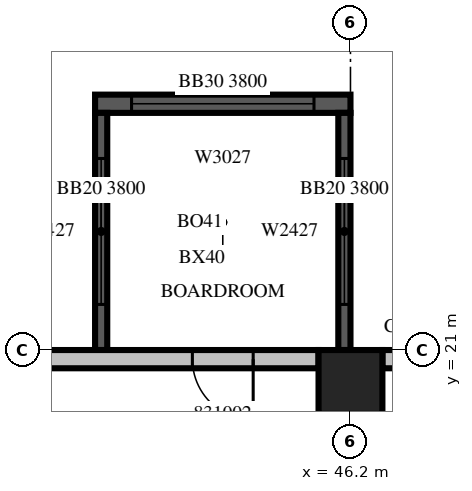
"""IFC4 building model, lengths in metres.
Left out: names, types, materials, properties, quantities, classifications, styles, units other than length and angle.
Written with IfcOpenShell. Run it as: python <this file> out.ifc"""

import sys

from ifc_helpers import new_model, si_unit, direction, frame, frame_2d, origin, origin_2d, place, context, subcontext, project, spatial, rectangle, extrude, source, transform, mapped, element, fill, save


model = new_model("IFC4")
c1 = context("Model", 3, precision=1e-05, world=origin(), true_north=direction((0.0, 1.0)))
c2 = subcontext(c1, "Body", "Model", "MODEL_VIEW")
j1 = project(units=[si_unit("LENGTHUNIT", "METRE"), si_unit("PLANEANGLEUNIT", "RADIAN")], contexts=[c1])
p1 = place(None, origin())
s1 = spatial("IfcSite", under=j1, at=p1, CompositionType="ELEMENT")
p2 = place(p1, origin())
s2 = spatial("IfcBuilding", under=s1, at=p2, CompositionType="ELEMENT")
p3 = place(p2, frame((0.0, 0.0, 141.3)))
s3 = spatial("IfcBuildingStorey", under=s2, at=p3, CompositionType="ELEMENT", Elevation=141.3)
m1 = source(origin(), c2, "Body", "SweptSolid", [
    extrude(rectangle(XDim=1.05, YDim=1.05, at=origin_2d()), origin(), (0.0, 0.0, 1.0), 4.2),
])
p4 = place(p3, frame((46.2, 20.475, 0.0), z_axis=(0.0, 0.0, 1.0), x_axis=(1.0, 0.0, 0.0)))
e1 = element("IfcColumn", 1, at=p4, inside=s3, PredefinedType="COLUMN", context=c2, shape_type="MappedRepresentation", body=[
    mapped(m1, transform((0.0, 0.0, 0.0), scale=1.0)),
])
m2 = source(origin(), c2, "Body", "SweptSolid", [
    extrude(rectangle(XDim=4.2, YDim=0.3, at=frame_2d((2.1, 0.0))), origin(), (0.0, 0.0, 1.0), 3.8),
])
p5 = place(p3, frame((46.2, 25.05, 0.0), z_axis=(0.0, 0.0, 1.0), x_axis=(-1.0, 0.0, 0.0)))
e2 = element("IfcWall", 2, at=p5, inside=s3, PredefinedType="SOLIDWALL", context=c2, shape_type="MappedRepresentation", body=[
    mapped(m2, transform((0.0, 0.0, 0.0), scale=1.0)),
])
m3 = source(origin(), c2, "Body", "SweptSolid", [
    extrude(rectangle(XDim=3.0, YDim=2.7, at=frame_2d((1.5, 1.35))), frame((0.0, 0.16, 0.0), z_axis=(0.0, -1.0, 0.0), x_axis=(1.0, 0.0, 0.0)), (0.0, 0.0, 1.0), 0.32),
])
p6 = place(p5, frame((0.6, 0.0, 0.6)))
e3 = element("IfcOpeningElement", 3, at=p6, cuts=e2, PredefinedType="OPENING", context=c2, shape_type="MappedRepresentation", body=[
    mapped(m3, transform((0.0, 0.0, 0.0), scale=1.0)),
])
m4 = source(origin(), c2, "Body", "SweptSolid", [
    extrude(rectangle(XDim=3.9, YDim=0.2, at=frame_2d((1.95, 0.0))), origin(), (0.0, 0.0, 1.0), 3.8),
])
p7 = place(p3, frame((46.1, 21.0, 0.0), z_axis=(0.0, 0.0, 1.0), x_axis=(0.0, 1.0, 0.0)))
e4 = element("IfcWall", 4, at=p7, inside=s3, PredefinedType="SOLIDWALL", context=c2, shape_type="MappedRepresentation", body=[
    mapped(m4, transform((0.0, 0.0, 0.0), scale=1.0)),
])
m5 = source(origin(), c2, "Body", "SweptSolid", [
    extrude(rectangle(XDim=2.4, YDim=2.7, at=frame_2d((1.2, 1.35))), frame((0.0, 0.11, 0.0), z_axis=(0.0, -1.0, 0.0), x_axis=(1.0, 0.0, 0.0)), (0.0, 0.0, 1.0), 0.22),
])
p8 = place(p7, frame((0.75, 0.0, 0.6)))
e5 = element("IfcOpeningElement", 5, at=p8, cuts=e4, PredefinedType="OPENING", context=c2, shape_type="MappedRepresentation", body=[
    mapped(m5, transform((0.0, 0.0, 0.0), scale=1.0)),
])
p9 = place(p3, frame((42.1, 21.0, 0.0), z_axis=(0.0, 0.0, 1.0), x_axis=(0.0, 1.0, 0.0)))
e6 = element("IfcWall", 6, at=p9, inside=s3, PredefinedType="SOLIDWALL", context=c2, shape_type="MappedRepresentation", body=[
    mapped(m4, transform((0.0, 0.0, 0.0), scale=1.0)),
])
p10 = place(p9, frame((0.75, 0.0, 0.6)))
e7 = element("IfcOpeningElement", 7, at=p10, cuts=e6, PredefinedType="OPENING", context=c2, shape_type="MappedRepresentation", body=[
    mapped(m5, transform((0.0, 0.0, 0.0), scale=1.0)),
])
m6 = source(origin(), c2, "Body", "SweptSolid", [
    extrude(rectangle(XDim=4.83, YDim=0.3, at=frame_2d((2.415, 0.0))), origin(), (0.0, 0.0, 1.0), 3.8),
])
p11 = place(p3, frame((51.555, 20.85, 0.0), z_axis=(0.0, 0.0, 1.0), x_axis=(-1.0, 0.0, 0.0)))
e8 = element("IfcWall", 8, at=p11, inside=s3, PredefinedType="STANDARD", context=c2, shape_type="MappedRepresentation", body=[
    mapped(m6, transform((0.0, 0.0, 0.0), scale=1.0)),
])
m7 = source(origin(), c2, "Body", "SweptSolid", [
    extrude(rectangle(XDim=2.4, YDim=2.7, at=frame_2d((1.2, 1.35))), frame((0.0, 0.16, 0.0), z_axis=(0.0, -1.0, 0.0), x_axis=(1.0, 0.0, 0.0)), (0.0, 0.0, 1.0), 0.32),
])
p12 = place(p11, frame((2.055, 0.0, 0.6)))
e9 = element("IfcOpeningElement", 9, at=p12, cuts=e8, PredefinedType="OPENING", context=c2, shape_type="MappedRepresentation", body=[
    mapped(m7, transform((0.0, 0.0, 0.0), scale=1.0)),
])
m8 = source(origin(), c2, "Body", "SweptSolid", [
    extrude(rectangle(XDim=7.35, YDim=0.3, at=frame_2d((3.675, 0.0))), origin(), (0.0, 0.0, 1.0), 3.8),
])
p13 = place(p3, frame((45.675, 20.85, 0.0), z_axis=(0.0, 0.0, 1.0), x_axis=(-1.0, 0.0, 0.0)))
e10 = element("IfcWall", 10, at=p13, inside=s3, PredefinedType="STANDARD", context=c2, shape_type="MappedRepresentation", body=[
    mapped(m8, transform((0.0, 0.0, 0.0), scale=1.0)),
])
m9 = source(origin(), c2, "Body", "SweptSolid", [
    extrude(rectangle(XDim=1.0, YDim=2.1, at=frame_2d((0.5, 1.05))), frame((0.0, 0.16, 0.0), z_axis=(0.0, -1.0, 0.0), x_axis=(1.0, 0.0, 0.0)), (0.0, 0.0, 1.0), 0.32),
])
p14 = place(p13, frame((1.075, 0.0, 0.0)))
e11 = element("IfcOpeningElement", 11, at=p14, cuts=e10, PredefinedType="OPENING", context=c2, shape_type="MappedRepresentation", body=[
    mapped(m9, transform((0.0, 0.0, 0.0), scale=1.0)),
])
m10 = source(origin(), c2, "Body", "SweptSolid", [
    extrude(rectangle(XDim=3.0, YDim=2.7, at=frame_2d((1.5, 1.35))), frame((0.0, 0.03, 0.0), z_axis=(0.0, -1.0, 0.0), x_axis=(1.0, 0.0, 0.0)), (0.0, 0.0, 1.0), 0.06),
])
p15 = place(p6, origin())
e12 = element("IfcWindow", 12, at=p15, inside=s3, PartitioningType="SINGLE_PANEL", PredefinedType="WINDOW", context=c2, shape_type="MappedRepresentation", body=[
    mapped(m10, transform((0.0, 0.0, 0.0), scale=1.0)),
])
fill(e3, e12)
m11 = source(origin(), c2, "Body", "SweptSolid", [
    extrude(rectangle(XDim=2.4, YDim=2.7, at=frame_2d((1.2, 1.35))), frame((0.0, 0.03, 0.0), z_axis=(0.0, -1.0, 0.0), x_axis=(1.0, 0.0, 0.0)), (0.0, 0.0, 1.0), 0.06),
])
p16 = place(p8, origin())
e13 = element("IfcWindow", 13, at=p16, inside=s3, PartitioningType="SINGLE_PANEL", PredefinedType="WINDOW", context=c2, shape_type="MappedRepresentation", body=[
    mapped(m11, transform((0.0, 0.0, 0.0), scale=1.0)),
])
fill(e5, e13)
p17 = place(p10, origin())
e14 = element("IfcWindow", 14, at=p17, inside=s3, PartitioningType="SINGLE_PANEL", PredefinedType="WINDOW", context=c2, shape_type="MappedRepresentation", body=[
    mapped(m11, transform((0.0, 0.0, 0.0), scale=1.0)),
])
fill(e7, e14)
m12 = source(origin(), c2, "Body", "SweptSolid", [
    extrude(rectangle(XDim=1.0, YDim=2.1, at=frame_2d((0.5, 1.05))), frame((0.0, 0.025, 0.0), z_axis=(0.0, -1.0, 0.0), x_axis=(1.0, 0.0, 0.0)), (0.0, 0.0, 1.0), 0.05),
])
p18 = place(p14, origin())
e15 = element("IfcDoor", 15, at=p18, inside=s3, OperationType="SINGLE_SWING_LEFT", PredefinedType="DOOR", context=c2, shape_type="MappedRepresentation", body=[
    mapped(m12, transform((0.0, 0.0, 0.0), scale=1.0)),
])
fill(e11, e15)
save(model, sys.argv[1])
